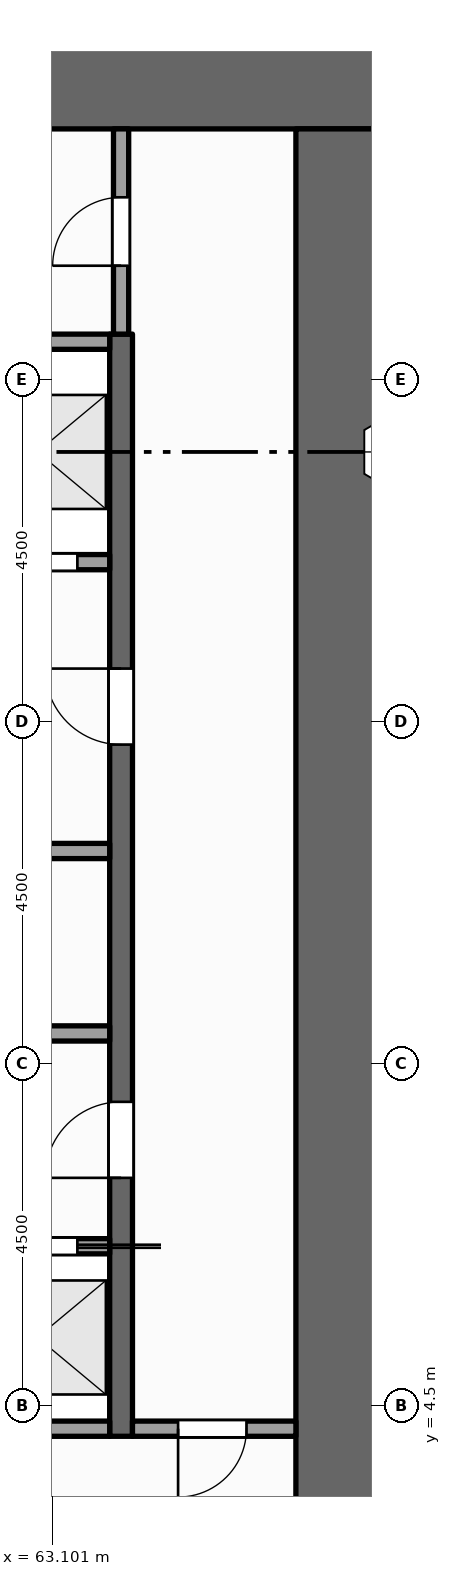
"""IFC4 building model, lengths in metres.
Left out: names, types, materials, properties, quantities, classifications, styles, units other than length and angle.
Written with IfcOpenShell. Run it as: python <this file> out.ifc"""

import sys

from ifc_helpers import new_model, si_unit, direction, frame, frame_2d, origin, place, context, subcontext, project, spatial, rectangle, extrude, element, fill, save


model = new_model("IFC4")
c1 = context("Model", 3, precision=1e-05, world=origin(), true_north=direction((0.0, 1.0)))
c2 = subcontext(c1, "Body", "Model", "MODEL_VIEW")
j1 = project(units=[si_unit("LENGTHUNIT", "METRE"), si_unit("PLANEANGLEUNIT", "RADIAN")], contexts=[c1])
p1 = place(None, origin())
s1 = spatial("IfcSite", under=j1, at=p1, CompositionType="ELEMENT")
p2 = place(p1, origin())
s2 = spatial("IfcBuilding", under=s1, at=p2, CompositionType="ELEMENT")
p3 = place(p2, frame((0.0, 0.0, 33.0)))
s3 = spatial("IfcBuildingStorey", under=s2, at=p3, CompositionType="ELEMENT", Elevation=33.0)
p4 = place(p3, frame((54.0, 21.9, -0.15), z_axis=(0.0, 0.0, 1.0), x_axis=(1.0, 0.0, 0.0)))
e1 = element("IfcWall", 1, at=p4, inside=s3, PredefinedType="SHEAR", context=c2, shape_type="SweptSolid", body=[
    extrude(rectangle(XDim=13.5, YDim=1.2, at=frame_2d((6.75, 0.0))), origin(), (0.0, 0.0, 1.0), 4.0),
])
p5 = place(p3, frame((66.9, 1.2, -0.15), z_axis=(0.0, 0.0, 1.0), x_axis=(0.0, 1.0, 0.0)))
e2 = element("IfcWall", 2, at=p5, inside=s3, PredefinedType="SHEAR", context=c2, shape_type="SweptSolid", body=[
    extrude(rectangle(XDim=20.1, YDim=1.2, at=frame_2d((10.05, 0.0))), origin(), (0.0, 0.0, 1.0), 4.0),
])
p6 = place(p3, frame((64.0, 4.1, 0.0), z_axis=(0.0, 0.0, 1.0), x_axis=(0.0, 1.0, 0.0)))
e3 = element("IfcWall", 3, at=p6, inside=s3, PredefinedType="SHEAR", context=c2, shape_type="SweptSolid", body=[
    extrude(rectangle(XDim=14.5, YDim=0.3, at=frame_2d((7.25, 0.0))), origin(), (0.0, 0.0, 1.0), 3.85),
])
p7 = place(p6, frame((3.4, 0.0, 0.0)))
e4 = element("IfcOpeningElement", 4, at=p7, cuts=e3, PredefinedType="OPENING", context=c2, shape_type="SweptSolid", body=[
    extrude(rectangle(XDim=1.0, YDim=2.1, at=frame_2d((0.5, 1.05))), frame((0.0, 0.16, 0.0), z_axis=(0.0, -1.0, 0.0), x_axis=(1.0, 0.0, 0.0)), (0.0, 0.0, 1.0), 0.32),
])
p8 = place(p6, frame((9.1, 0.0, 0.0)))
e5 = element("IfcOpeningElement", 5, at=p8, cuts=e3, PredefinedType="OPENING", context=c2, shape_type="SweptSolid", body=[
    extrude(rectangle(XDim=1.0, YDim=2.1, at=frame_2d((0.5, 1.05))), frame((0.0, 0.16, 0.0), z_axis=(0.0, -1.0, 0.0), x_axis=(1.0, 0.0, 0.0)), (0.0, 0.0, 1.0), 0.32),
])
p9 = place(p3, frame((64.0, 18.6, 0.0), z_axis=(0.0, 0.0, 1.0), x_axis=(0.0, 1.0, 0.0)))
e6 = element("IfcWall", 6, at=p9, inside=s3, PredefinedType="PARTITIONING", context=c2, shape_type="SweptSolid", body=[
    extrude(rectangle(XDim=2.7, YDim=0.2, at=frame_2d((1.35, 0.0))), origin(), (0.0, 0.0, 1.0), 3.85),
])
p10 = place(p9, frame((0.9, 0.0, 0.0)))
e7 = element("IfcOpeningElement", 7, at=p10, cuts=e6, PredefinedType="OPENING", context=c2, shape_type="SweptSolid", body=[
    extrude(rectangle(XDim=0.9, YDim=2.1, at=frame_2d((0.45, 1.05))), frame((0.0, 0.11, 0.0), z_axis=(0.0, -1.0, 0.0), x_axis=(1.0, 0.0, 0.0)), (0.0, 0.0, 1.0), 0.22),
])
p11 = place(p3, frame((61.9, 4.2, 0.0), z_axis=(0.0, 0.0, 1.0), x_axis=(1.0, 0.0, 0.0)))
e8 = element("IfcWall", 8, at=p11, inside=s3, PredefinedType="SOLIDWALL", context=c2, shape_type="SweptSolid", body=[
    extrude(rectangle(XDim=1.95, YDim=0.2, at=frame_2d((0.975, 0.0))), origin(), (0.0, 0.0, 1.0), 3.85),
])
p12 = place(p3, frame((64.15, 4.2, 0.0), z_axis=(0.0, 0.0, 1.0), x_axis=(1.0, 0.0, 0.0)))
e9 = element("IfcWall", 9, at=p12, inside=s3, PredefinedType="PARTITIONING", context=c2, shape_type="SweptSolid", body=[
    extrude(rectangle(XDim=2.15, YDim=0.2, at=frame_2d((1.075, 0.0))), origin(), (0.0, 0.0, 1.0), 3.85),
])
p13 = place(p12, frame((0.6, 0.0, 0.0)))
e10 = element("IfcOpeningElement", 10, at=p13, cuts=e9, PredefinedType="OPENING", context=c2, shape_type="SweptSolid", body=[
    extrude(rectangle(XDim=0.9, YDim=2.1, at=frame_2d((0.45, 1.05))), frame((0.0, 0.11, 0.0), z_axis=(0.0, -1.0, 0.0), x_axis=(1.0, 0.0, 0.0)), (0.0, 0.0, 1.0), 0.22),
])
p14 = place(p3, frame((61.9, 6.6, 0.0), z_axis=(0.0, 0.0, 1.0), x_axis=(1.0, 0.0, 0.0)))
e11 = element("IfcWall", 11, at=p14, inside=s3, PredefinedType="SOLIDWALL", context=c2, shape_type="SweptSolid", body=[
    extrude(rectangle(XDim=1.95, YDim=0.2, at=frame_2d((0.975, 0.0))), origin(), (0.0, 0.0, 1.0), 3.85),
])
p15 = place(p14, frame((0.425, 0.0, 0.012)))
e12 = element("IfcOpeningElement", 12, at=p15, cuts=e11, PredefinedType="OPENING", context=c2, shape_type="SweptSolid", body=[
    extrude(rectangle(XDim=1.1, YDim=2.1, at=frame_2d((0.55, 1.05))), frame((0.0, 0.11, 0.0), z_axis=(0.0, -1.0, 0.0), x_axis=(1.0, 0.0, 0.0)), (0.0, 0.0, 1.0), 0.22),
])
p16 = place(p3, frame((59.7, 9.4, 0.0), z_axis=(0.0, 0.0, 1.0), x_axis=(1.0, 0.0, 0.0)))
e13 = element("IfcWall", 13, at=p16, inside=s3, PredefinedType="PARTITIONING", context=c2, shape_type="SweptSolid", body=[
    extrude(rectangle(XDim=4.15, YDim=0.2, at=frame_2d((2.075, 0.0))), origin(), (0.0, 0.0, 1.0), 3.85),
])
p17 = place(p16, frame((1.625, 0.0, 0.0)))
e14 = element("IfcOpeningElement", 14, at=p17, cuts=e13, PredefinedType="OPENING", context=c2, shape_type="SweptSolid", body=[
    extrude(rectangle(XDim=0.9, YDim=2.1, at=frame_2d((0.45, 1.05))), frame((0.0, 0.11, 0.0), z_axis=(0.0, -1.0, 0.0), x_axis=(1.0, 0.0, 0.0)), (0.0, 0.0, 1.0), 0.22),
])
p18 = place(p3, frame((59.7, 11.8, 0.0), z_axis=(0.0, 0.0, 1.0), x_axis=(1.0, 0.0, 0.0)))
e15 = element("IfcWall", 15, at=p18, inside=s3, PredefinedType="PARTITIONING", context=c2, shape_type="SweptSolid", body=[
    extrude(rectangle(XDim=4.15, YDim=0.2, at=frame_2d((2.075, 0.0))), origin(), (0.0, 0.0, 1.0), 3.85),
])
p19 = place(p3, frame((61.9, 15.6, 0.0), z_axis=(0.0, 0.0, 1.0), x_axis=(1.0, 0.0, 0.0)))
e16 = element("IfcWall", 16, at=p19, inside=s3, PredefinedType="SOLIDWALL", context=c2, shape_type="SweptSolid", body=[
    extrude(rectangle(XDim=1.95, YDim=0.2, at=frame_2d((0.975, 0.0))), origin(), (0.0, 0.0, 1.0), 3.85),
])
p20 = place(p19, frame((0.425, 0.0, 0.012)))
e17 = element("IfcOpeningElement", 17, at=p20, cuts=e16, PredefinedType="OPENING", context=c2, shape_type="SweptSolid", body=[
    extrude(rectangle(XDim=1.1, YDim=2.1, at=frame_2d((0.55, 1.05))), frame((0.0, 0.11, 0.0), z_axis=(0.0, -1.0, 0.0), x_axis=(1.0, 0.0, 0.0)), (0.0, 0.0, 1.0), 0.22),
])
p21 = place(p3, frame((61.9, 18.5, 0.0), z_axis=(0.0, 0.0, 1.0), x_axis=(1.0, 0.0, 0.0)))
e18 = element("IfcWall", 18, at=p21, inside=s3, PredefinedType="SOLIDWALL", context=c2, shape_type="SweptSolid", body=[
    extrude(rectangle(XDim=1.95, YDim=0.2, at=frame_2d((0.975, 0.0))), origin(), (0.0, 0.0, 1.0), 3.85),
])
p22 = place(p15, origin())
e19 = element("IfcDoor", 19, at=p22, inside=s3, OperationType="SLIDING_TO_RIGHT", PredefinedType="DOOR", context=c2, shape_type="SweptSolid", body=[
    extrude(rectangle(XDim=1.1, YDim=2.1, at=frame_2d((0.55, 1.05))), frame((0.0, 0.025, 0.0), z_axis=(0.0, -1.0, 0.0), x_axis=(1.0, 0.0, 0.0)), (0.0, 0.0, 1.0), 0.05),
])
fill(e12, e19)
p23 = place(p20, origin())
e20 = element("IfcDoor", 20, at=p23, inside=s3, OperationType="SLIDING_TO_LEFT", PredefinedType="DOOR", context=c2, shape_type="SweptSolid", body=[
    extrude(rectangle(XDim=1.1, YDim=2.1, at=frame_2d((0.55, 1.05))), frame((0.0, 0.025, 0.0), z_axis=(0.0, -1.0, 0.0), x_axis=(1.0, 0.0, 0.0)), (0.0, 0.0, 1.0), 0.05),
])
fill(e17, e20)
p24 = place(p7, origin())
e21 = element("IfcDoor", 21, at=p24, inside=s3, OperationType="SINGLE_SWING_LEFT", PredefinedType="DOOR", context=c2, shape_type="SweptSolid", body=[
    extrude(rectangle(XDim=1.0, YDim=2.1, at=frame_2d((0.5, 1.05))), frame((0.0, 0.025, 0.0), z_axis=(0.0, -1.0, 0.0), x_axis=(1.0, 0.0, 0.0)), (0.0, 0.0, 1.0), 0.05),
])
fill(e4, e21)
p25 = place(p8, origin())
e22 = element("IfcDoor", 22, at=p25, inside=s3, OperationType="SINGLE_SWING_RIGHT", PredefinedType="DOOR", context=c2, shape_type="SweptSolid", body=[
    extrude(rectangle(XDim=1.0, YDim=2.1, at=frame_2d((0.5, 1.05))), frame((0.0, 0.025, 0.0), z_axis=(0.0, -1.0, 0.0), x_axis=(1.0, 0.0, 0.0)), (0.0, 0.0, 1.0), 0.05),
])
fill(e5, e22)
p26 = place(p13, origin())
e23 = element("IfcDoor", 23, at=p26, inside=s3, OperationType="SINGLE_SWING_LEFT", PredefinedType="DOOR", context=c2, shape_type="SweptSolid", body=[
    extrude(rectangle(XDim=0.9, YDim=2.1, at=frame_2d((0.45, 1.05))), frame((0.0, 0.025, 0.0), z_axis=(0.0, -1.0, 0.0), x_axis=(1.0, 0.0, 0.0)), (0.0, 0.0, 1.0), 0.05),
])
fill(e10, e23)
p27 = place(p10, origin())
e24 = element("IfcDoor", 24, at=p27, inside=s3, OperationType="SINGLE_SWING_LEFT", PredefinedType="DOOR", context=c2, shape_type="SweptSolid", body=[
    extrude(rectangle(XDim=0.9, YDim=2.1, at=frame_2d((0.45, 1.05))), frame((0.0, 0.025, 0.0), z_axis=(0.0, -1.0, 0.0), x_axis=(1.0, 0.0, 0.0)), (0.0, 0.0, 1.0), 0.05),
])
fill(e7, e24)
save(model, sys.argv[1])
